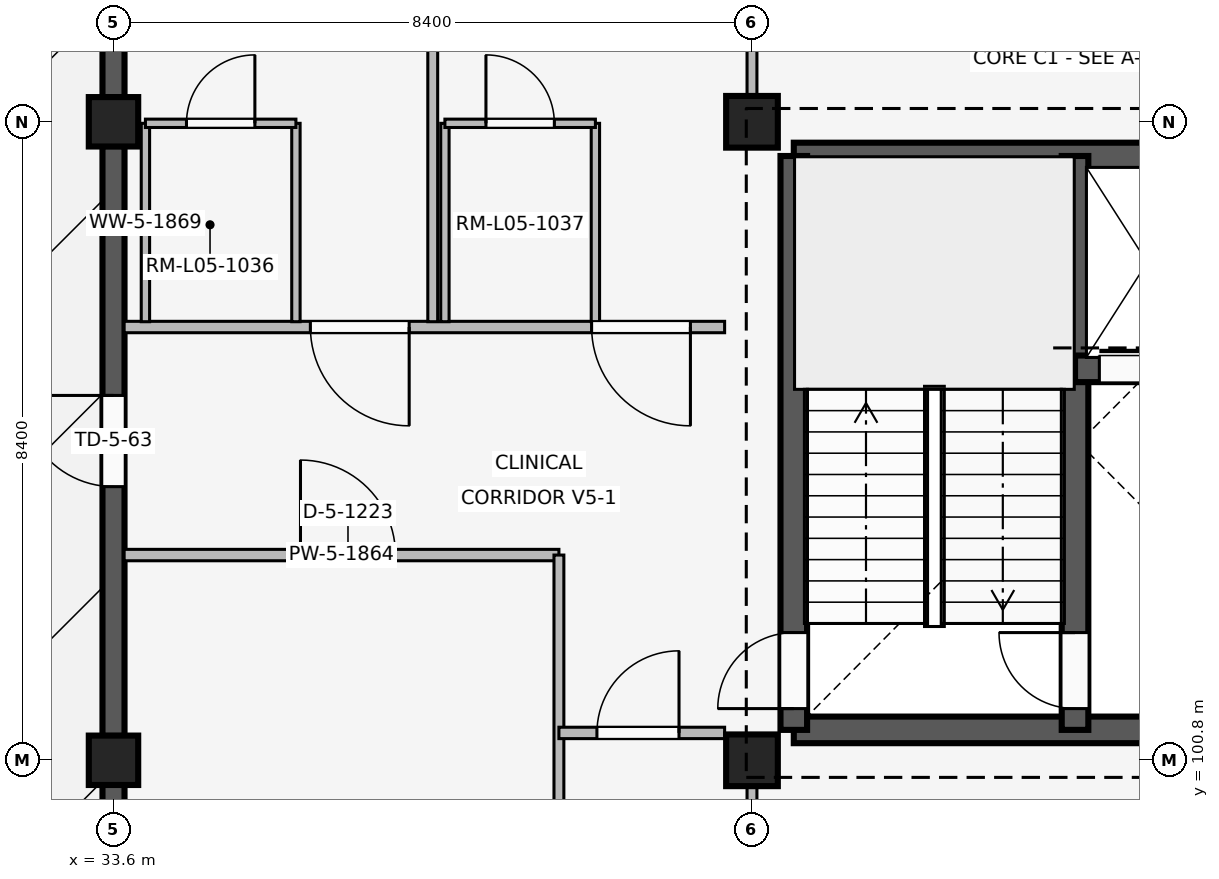
"""IFC4 building model, lengths in metres.
Left out: names, types, materials, properties, quantities, classifications, styles, units other than length and angle.
Written with IfcOpenShell. Run it as: python <this file> out.ifc"""

import sys

from ifc_helpers import new_model, si_unit, direction, frame, frame_2d, origin, origin_2d, place, context, subcontext, project, spatial, rectangle, extrude, element, fill, save


model = new_model("IFC4")
c1 = context("Model", 3, precision=1e-05, world=origin(), true_north=direction((0.0, 1.0)))
c2 = subcontext(c1, "Body", "Model", "MODEL_VIEW")
j1 = project(units=[si_unit("LENGTHUNIT", "METRE"), si_unit("PLANEANGLEUNIT", "RADIAN")], contexts=[c1])
p1 = place(None, origin())
s1 = spatial("IfcSite", under=j1, at=p1, CompositionType="ELEMENT")
p2 = place(p1, origin())
s2 = spatial("IfcBuilding", under=s1, at=p2, CompositionType="ELEMENT")
p3 = place(p2, frame((0.0, 0.0, 20.4)))
s3 = spatial("IfcBuildingStorey", under=s2, at=p3, CompositionType="ELEMENT", Elevation=20.4)
for number, where, z_axis, x_axis in (
    (1, (33.6, 100.8, 0.0), (0.0, 0.0, 1.0), (1.0, 0.0, 0.0)),
    (2, (33.6, 109.2, 0.0), (0.0, 0.0, 1.0), (1.0, 0.0, 0.0)),
):
    element("IfcColumn", number, at=place(p3, frame(where, z_axis=z_axis, x_axis=x_axis)), inside=s3, PredefinedType="COLUMN", context=c2, shape_type="SweptSolid", body=[
        extrude(rectangle(XDim=0.65, YDim=0.65, at=origin_2d()), origin(), (0.0, 0.0, 1.0), 4.2),
    ])
for number, where, z_axis, x_axis in (
    (3, (42.0, 100.8, 0.0), (0.0, 0.0, 1.0), (1.0, 0.0, 0.0)),
    (4, (42.0, 109.2, 0.0), (0.0, 0.0, 1.0), (1.0, 0.0, 0.0)),
):
    element("IfcColumn", number, at=place(p3, frame(where, z_axis=z_axis, x_axis=x_axis)), inside=s3, PredefinedType="COLUMN", context=c2, shape_type="SweptSolid", body=[
        extrude(rectangle(XDim=0.68, YDim=0.68, at=origin_2d()), origin(), (0.0, 0.0, 1.0), 4.2),
    ])
p4 = place(p3, frame((33.6, 92.72, 0.0), z_axis=(0.0, 0.0, 1.0), x_axis=(0.0, 1.0, 0.0)))
e5 = element("IfcWall", 5, at=p4, inside=s3, PredefinedType="SOLIDWALL", context=c2, shape_type="SweptSolid", body=[
    extrude(rectangle(XDim=7.76, YDim=0.29, at=frame_2d((3.88, 0.0))), origin(), (0.0, 0.0, 1.0), 3.34),
])
p5 = place(p4, frame((1.41, 0.0, 0.85)))
e6 = element("IfcOpeningElement", 6, at=p5, cuts=e5, PredefinedType="OPENING", context=c2, shape_type="SweptSolid", body=[
    extrude(rectangle(XDim=0.75, YDim=1.85, at=frame_2d((0.375, 0.925))), frame((0.0, 0.155, 0.0), z_axis=(0.0, -1.0, 0.0), x_axis=(1.0, 0.0, 0.0)), (0.0, 0.0, 1.0), 0.31),
])
p6 = place(p4, frame((5.6, 0.0, 0.85)))
e7 = element("IfcOpeningElement", 7, at=p6, cuts=e5, PredefinedType="OPENING", context=c2, shape_type="SweptSolid", body=[
    extrude(rectangle(XDim=0.75, YDim=1.85, at=frame_2d((0.375, 0.925))), frame((0.0, 0.155, 0.0), z_axis=(0.0, -1.0, 0.0), x_axis=(1.0, 0.0, 0.0)), (0.0, 0.0, 1.0), 0.31),
])
p7 = place(p3, frame((33.6, 101.12, 0.0), z_axis=(0.0, 0.0, 1.0), x_axis=(0.0, 1.0, 0.0)))
e8 = element("IfcWall", 8, at=p7, inside=s3, PredefinedType="SOLIDWALL", context=c2, shape_type="SweptSolid", body=[
    extrude(rectangle(XDim=7.76, YDim=0.29, at=frame_2d((3.88, 0.0))), origin(), (0.0, 0.0, 1.0), 3.34),
])
p8 = place(p7, frame((3.28, 0.0, 0.0)))
e9 = element("IfcOpeningElement", 9, at=p8, cuts=e8, PredefinedType="OPENING", context=c2, shape_type="SweptSolid", body=[
    extrude(rectangle(XDim=1.2, YDim=2.25, at=frame_2d((0.6, 1.125))), frame((0.0, 0.155, 0.0), z_axis=(0.0, -1.0, 0.0), x_axis=(1.0, 0.0, 0.0)), (0.0, 0.0, 1.0), 0.31),
])
p9 = place(p3, frame((33.6, 109.52, 0.0), z_axis=(0.0, 0.0, 1.0), x_axis=(0.0, 1.0, 0.0)))
e10 = element("IfcWall", 10, at=p9, inside=s3, PredefinedType="SOLIDWALL", context=c2, shape_type="SweptSolid", body=[
    extrude(rectangle(XDim=7.76, YDim=0.29, at=frame_2d((3.88, 0.0))), origin(), (0.0, 0.0, 1.0), 3.34),
])
p10 = place(p9, frame((1.31, 0.0, 0.85)))
e11 = element("IfcOpeningElement", 11, at=p10, cuts=e10, PredefinedType="OPENING", context=c2, shape_type="SweptSolid", body=[
    extrude(rectangle(XDim=0.95, YDim=1.6, at=frame_2d((0.475, 0.8))), frame((0.0, 0.155, 0.0), z_axis=(0.0, -1.0, 0.0), x_axis=(1.0, 0.0, 0.0)), (0.0, 0.0, 1.0), 0.31),
])
p11 = place(p9, frame((5.5, 0.0, 0.85)))
e12 = element("IfcOpeningElement", 12, at=p11, cuts=e10, PredefinedType="OPENING", context=c2, shape_type="SweptSolid", body=[
    extrude(rectangle(XDim=0.95, YDim=1.6, at=frame_2d((0.475, 0.8))), frame((0.0, 0.155, 0.0), z_axis=(0.0, -1.0, 0.0), x_axis=(1.0, 0.0, 0.0)), (0.0, 0.0, 1.0), 0.31),
])
p12 = place(p3, frame((42.55, 101.2, 0.0), z_axis=(0.0, 0.0, 1.0), x_axis=(1.0, 0.0, 0.0)))
e13 = element("IfcWall", 13, at=p12, inside=s3, PredefinedType="SHEAR", context=c2, shape_type="SweptSolid", body=[
    extrude(rectangle(XDim=7.5, YDim=0.35, at=frame_2d((3.75, 0.0))), origin(), (0.0, 0.0, 1.0), 3.92),
])
p13 = place(p12, frame((4.85, 0.0, 0.0)))
e14 = element("IfcOpeningElement", 14, at=p13, cuts=e13, PredefinedType="OPENING", context=c2, shape_type="SweptSolid", body=[
    extrude(rectangle(XDim=1.2, YDim=2.2, at=frame_2d((0.6, 1.1))), frame((0.0, 0.185, 0.0), z_axis=(0.0, -1.0, 0.0), x_axis=(1.0, 0.0, 0.0)), (0.0, 0.0, 1.0), 0.37),
])
p14 = place(p3, frame((42.55, 108.75, 0.0), z_axis=(0.0, 0.0, 1.0), x_axis=(1.0, 0.0, 0.0)))
e15 = element("IfcWall", 15, at=p14, inside=s3, PredefinedType="SHEAR", context=c2, shape_type="SweptSolid", body=[
    extrude(rectangle(XDim=7.5, YDim=0.35, at=frame_2d((3.75, 0.0))), origin(), (0.0, 0.0, 1.0), 3.92),
])
p15 = place(p3, frame((42.55, 101.2, 0.0), z_axis=(0.0, 0.0, 1.0), x_axis=(0.0, 1.0, 0.0)))
e16 = element("IfcWall", 16, at=p15, inside=s3, PredefinedType="SHEAR", context=c2, shape_type="SweptSolid", body=[
    extrude(rectangle(XDim=7.55, YDim=0.35, at=frame_2d((3.775, 0.0))), origin(), (0.0, 0.0, 1.0), 3.92),
])
p16 = place(p15, frame((0.28, 0.0, 0.0)))
e17 = element("IfcOpeningElement", 17, at=p16, cuts=e16, PredefinedType="OPENING", context=c2, shape_type="SweptSolid", body=[
    extrude(rectangle(XDim=1.0, YDim=2.15, at=frame_2d((0.5, 1.075))), frame((0.0, 0.185, 0.0), z_axis=(0.0, -1.0, 0.0), x_axis=(1.0, 0.0, 0.0)), (0.0, 0.0, 1.0), 0.37),
])
p17 = place(p3, frame((46.25, 101.2, 0.0), z_axis=(0.0, 0.0, 1.0), x_axis=(0.0, 1.0, 0.0)))
e18 = element("IfcWall", 18, at=p17, inside=s3, PredefinedType="SHEAR", context=c2, shape_type="SweptSolid", body=[
    extrude(rectangle(XDim=7.55, YDim=0.35, at=frame_2d((3.775, 0.0))), origin(), (0.0, 0.0, 1.0), 3.92),
])
p18 = place(p17, frame((0.28, 0.0, 0.0)))
e19 = element("IfcOpeningElement", 19, at=p18, cuts=e18, PredefinedType="OPENING", context=c2, shape_type="SweptSolid", body=[
    extrude(rectangle(XDim=1.0, YDim=2.15, at=frame_2d((0.5, 1.075))), frame((0.0, 0.185, 0.0), z_axis=(0.0, -1.0, 0.0), x_axis=(1.0, 0.0, 0.0)), (0.0, 0.0, 1.0), 0.37),
])
p19 = place(p3, frame((46.25, 105.95, 0.0), z_axis=(0.0, 0.0, 1.0), x_axis=(1.0, 0.0, 0.0)))
e20 = element("IfcWall", 20, at=p19, inside=s3, PredefinedType="SHEAR", context=c2, shape_type="SweptSolid", body=[
    extrude(rectangle(XDim=3.8, YDim=0.35, at=frame_2d((1.9, 0.0))), origin(), (0.0, 0.0, 1.0), 3.92),
])
p20 = place(p19, frame((0.32, 0.0, 0.0)))
e21 = element("IfcOpeningElement", 21, at=p20, cuts=e20, PredefinedType="OPENING", context=c2, shape_type="SweptSolid", body=[
    extrude(rectangle(XDim=1.35, YDim=2.25, at=frame_2d((0.675, 1.125))), frame((0.0, 0.185, 0.0), z_axis=(0.0, -1.0, 0.0), x_axis=(1.0, 0.0, 0.0)), (0.0, 0.0, 1.0), 0.37),
])
p21 = place(p19, frame((2.04, 0.0, 0.0)))
e22 = element("IfcOpeningElement", 22, at=p21, cuts=e20, PredefinedType="OPENING", context=c2, shape_type="SweptSolid", body=[
    extrude(rectangle(XDim=1.4, YDim=2.25, at=frame_2d((0.7, 1.125))), frame((0.0, 0.185, 0.0), z_axis=(0.0, -1.0, 0.0), x_axis=(1.0, 0.0, 0.0)), (0.0, 0.0, 1.0), 0.37),
])
p22 = place(p3, frame((33.74, 103.5, 0.0), z_axis=(0.0, 0.0, 1.0), x_axis=(1.0, 0.0, 0.0)))
e23 = element("IfcWall", 23, at=p22, inside=s3, PredefinedType="PARTITIONING", context=c2, shape_type="SweptSolid", body=[
    extrude(rectangle(XDim=5.72, YDim=0.15, at=frame_2d((2.86, 0.0))), origin(), (0.0, 0.0, 1.0), 3.32),
])
p23 = place(p22, frame((2.32, 0.0, 0.0)))
e24 = element("IfcOpeningElement", 24, at=p23, cuts=e23, PredefinedType="OPENING", context=c2, shape_type="SweptSolid", body=[
    extrude(rectangle(XDim=1.25, YDim=2.2, at=frame_2d((0.625, 1.1))), frame((0.0, 0.085, 0.0), z_axis=(0.0, -1.0, 0.0), x_axis=(1.0, 0.0, 0.0)), (0.0, 0.0, 1.0), 0.17),
])
p24 = place(p3, frame((39.46, 92.56, 0.0), z_axis=(0.0, 0.0, 1.0), x_axis=(0.0, 1.0, 0.0)))
e25 = element("IfcWall", 25, at=p24, inside=s3, PredefinedType="PARTITIONING", context=c2, shape_type="SweptSolid", body=[
    extrude(rectangle(XDim=10.94, YDim=0.13, at=frame_2d((5.47, 0.0))), origin(), (0.0, 0.0, 1.0), 3.32),
])
p25 = place(p3, frame((39.46, 101.16, 0.0), z_axis=(0.0, 0.0, 1.0), x_axis=(1.0, 0.0, 0.0)))
e26 = element("IfcWall", 26, at=p25, inside=s3, PredefinedType="PARTITIONING", context=c2, shape_type="SweptSolid", body=[
    extrude(rectangle(XDim=2.18, YDim=0.15, at=frame_2d((1.09, 0.0))), origin(), (0.0, 0.0, 1.0), 3.32),
])
p26 = place(p25, frame((0.5, 0.0, 0.0)))
e27 = element("IfcOpeningElement", 27, at=p26, cuts=e26, PredefinedType="OPENING", context=c2, shape_type="SweptSolid", body=[
    extrude(rectangle(XDim=1.08, YDim=2.15, at=frame_2d((0.54, 1.075))), frame((0.0, 0.085, 0.0), z_axis=(0.0, -1.0, 0.0), x_axis=(1.0, 0.0, 0.0)), (0.0, 0.0, 1.0), 0.17),
])
p27 = place(p3, frame((41.64, 106.5, 0.0), z_axis=(0.0, 0.0, 1.0), x_axis=(-1.0, 0.0, 0.0)))
e28 = element("IfcWall", 28, at=p27, inside=s3, PredefinedType="PARTITIONING", context=c2, shape_type="SweptSolid", body=[
    extrude(rectangle(XDim=7.9, YDim=0.15, at=frame_2d((3.95, 0.0))), origin(), (0.0, 0.0, 1.0), 3.32),
])
p28 = place(p27, frame((0.45, 0.0, 0.0)))
e29 = element("IfcOpeningElement", 29, at=p28, cuts=e28, PredefinedType="OPENING", context=c2, shape_type="SweptSolid", body=[
    extrude(rectangle(XDim=1.3, YDim=2.25, at=frame_2d((0.65, 1.125))), frame((0.0, 0.085, 0.0), z_axis=(0.0, -1.0, 0.0), x_axis=(1.0, 0.0, 0.0)), (0.0, 0.0, 1.0), 0.17),
])
p29 = place(p27, frame((4.15, 0.0, 0.0)))
e30 = element("IfcOpeningElement", 30, at=p29, cuts=e28, PredefinedType="OPENING", context=c2, shape_type="SweptSolid", body=[
    extrude(rectangle(XDim=1.3, YDim=2.25, at=frame_2d((0.65, 1.125))), frame((0.0, 0.085, 0.0), z_axis=(0.0, -1.0, 0.0), x_axis=(1.0, 0.0, 0.0)), (0.0, 0.0, 1.0), 0.17),
])
p30 = place(p3, frame((37.8, 106.57, 0.0), z_axis=(0.0, 0.0, 1.0), x_axis=(0.0, 1.0, 0.0)))
e31 = element("IfcWall", 31, at=p30, inside=s3, PredefinedType="PARTITIONING", context=c2, shape_type="SweptSolid", body=[
    extrude(rectangle(XDim=10.93, YDim=0.13, at=frame_2d((5.465, 0.0))), origin(), (0.0, 0.0, 1.0), 3.32),
])
for number, where, z_axis, x_axis in (
    (32, (34.02, 106.57, 0.0), (0.0, 0.0, 1.0), (0.0, 1.0, 0.0)),
    (33, (36.0, 106.57, 0.0), (0.0, 0.0, 1.0), (0.0, 1.0, 0.0)),
):
    element("IfcWall", number, at=place(p3, frame(where, z_axis=z_axis, x_axis=x_axis)), inside=s3, PredefinedType="PARTITIONING", context=c2, shape_type="SweptSolid", body=[
        extrude(rectangle(XDim=2.61, YDim=0.11, at=frame_2d((1.305, 0.0))), origin(), (0.0, 0.0, 1.0), 3.32),
    ])
p31 = place(p3, frame((34.02, 109.18, 0.0), z_axis=(0.0, 0.0, 1.0), x_axis=(1.0, 0.0, 0.0)))
e34 = element("IfcWall", 34, at=p31, inside=s3, PredefinedType="PARTITIONING", context=c2, shape_type="SweptSolid", body=[
    extrude(rectangle(XDim=1.98, YDim=0.11, at=frame_2d((0.99, 0.0))), origin(), (0.0, 0.0, 1.0), 3.32),
])
p32 = place(p31, frame((0.54, 0.0, 0.0)))
e35 = element("IfcOpeningElement", 35, at=p32, cuts=e34, PredefinedType="OPENING", context=c2, shape_type="SweptSolid", body=[
    extrude(rectangle(XDim=0.9, YDim=2.1, at=frame_2d((0.45, 1.05))), frame((0.0, 0.065, 0.0), z_axis=(0.0, -1.0, 0.0), x_axis=(1.0, 0.0, 0.0)), (0.0, 0.0, 1.0), 0.13),
])
for number, where, z_axis, x_axis in (
    (36, (37.96, 106.57, 0.0), (0.0, 0.0, 1.0), (0.0, 1.0, 0.0)),
    (37, (39.94, 106.57, 0.0), (0.0, 0.0, 1.0), (0.0, 1.0, 0.0)),
):
    element("IfcWall", number, at=place(p3, frame(where, z_axis=z_axis, x_axis=x_axis)), inside=s3, PredefinedType="PARTITIONING", context=c2, shape_type="SweptSolid", body=[
        extrude(rectangle(XDim=2.61, YDim=0.11, at=frame_2d((1.305, 0.0))), origin(), (0.0, 0.0, 1.0), 3.32),
    ])
p33 = place(p3, frame((37.96, 109.18, 0.0), z_axis=(0.0, 0.0, 1.0), x_axis=(1.0, 0.0, 0.0)))
e38 = element("IfcWall", 38, at=p33, inside=s3, PredefinedType="PARTITIONING", context=c2, shape_type="SweptSolid", body=[
    extrude(rectangle(XDim=1.98, YDim=0.11, at=frame_2d((0.99, 0.0))), origin(), (0.0, 0.0, 1.0), 3.32),
])
p34 = place(p33, frame((0.54, 0.0, 0.0)))
e39 = element("IfcOpeningElement", 39, at=p34, cuts=e38, PredefinedType="OPENING", context=c2, shape_type="SweptSolid", body=[
    extrude(rectangle(XDim=0.9, YDim=2.1, at=frame_2d((0.45, 1.05))), frame((0.0, 0.065, 0.0), z_axis=(0.0, -1.0, 0.0), x_axis=(1.0, 0.0, 0.0)), (0.0, 0.0, 1.0), 0.13),
])
p35 = place(p3, frame((42.0, 92.54, 0.0), z_axis=(0.0, 0.0, 1.0), x_axis=(0.0, 1.0, 0.0)))
e40 = element("IfcWall", 40, at=p35, inside=s3, PredefinedType="PARTITIONING", context=c2, shape_type="SweptSolid", body=[
    extrude(rectangle(XDim=8.21, YDim=0.13, at=frame_2d((4.105, 0.0))), origin(), (0.0, 0.0, 1.0), 3.32),
])
p36 = place(p35, frame((3.64, 0.0, 0.0)))
e41 = element("IfcOpeningElement", 41, at=p36, cuts=e40, PredefinedType="OPENING", context=c2, shape_type="SweptSolid", body=[
    extrude(rectangle(XDim=1.08, YDim=2.15, at=frame_2d((0.54, 1.075))), frame((0.0, 0.075, 0.0), z_axis=(0.0, -1.0, 0.0), x_axis=(1.0, 0.0, 0.0)), (0.0, 0.0, 1.0), 0.15),
])
p37 = place(p3, frame((42.0, 109.55, 0.0), z_axis=(0.0, 0.0, 1.0), x_axis=(0.0, 1.0, 0.0)))
e42 = element("IfcWall", 42, at=p37, inside=s3, PredefinedType="PARTITIONING", context=c2, shape_type="SweptSolid", body=[
    extrude(rectangle(XDim=7.91, YDim=0.13, at=frame_2d((3.955, 0.0))), origin(), (0.0, 0.0, 1.0), 3.32),
])
p38 = place(p37, frame((3.4, 0.0, 0.0)))
e43 = element("IfcOpeningElement", 43, at=p38, cuts=e42, PredefinedType="OPENING", context=c2, shape_type="SweptSolid", body=[
    extrude(rectangle(XDim=1.05, YDim=2.2, at=frame_2d((0.525, 1.1))), frame((0.0, 0.075, 0.0), z_axis=(0.0, -1.0, 0.0), x_axis=(1.0, 0.0, 0.0)), (0.0, 0.0, 1.0), 0.15),
])
p39 = place(p8, origin())
e44 = element("IfcDoor", 44, at=p39, inside=s3, OperationType="SINGLE_SWING_RIGHT", PredefinedType="DOOR", context=c2, shape_type="SweptSolid", body=[
    extrude(rectangle(XDim=1.2, YDim=2.25, at=frame_2d((0.6, 1.125))), frame((0.0, 0.025, 0.0), z_axis=(0.0, -1.0, 0.0), x_axis=(1.0, 0.0, 0.0)), (0.0, 0.0, 1.0), 0.05),
])
fill(e9, e44)
p40 = place(p16, origin())
e45 = element("IfcDoor", 45, at=p40, inside=s3, OperationType="SINGLE_SWING_LEFT", PredefinedType="DOOR", context=c2, shape_type="SweptSolid", body=[
    extrude(rectangle(XDim=1.0, YDim=2.15, at=frame_2d((0.5, 1.075))), frame((0.0, 0.025, 0.0), z_axis=(0.0, -1.0, 0.0), x_axis=(1.0, 0.0, 0.0)), (0.0, 0.0, 1.0), 0.05),
])
fill(e17, e45)
p41 = place(p18, origin())
e46 = element("IfcDoor", 46, at=p41, inside=s3, OperationType="SINGLE_SWING_RIGHT", PredefinedType="DOOR", context=c2, shape_type="SweptSolid", body=[
    extrude(rectangle(XDim=1.0, YDim=2.15, at=frame_2d((0.5, 1.075))), frame((0.0, 0.025, 0.0), z_axis=(0.0, -1.0, 0.0), x_axis=(1.0, 0.0, 0.0)), (0.0, 0.0, 1.0), 0.05),
])
fill(e19, e46)
p42 = place(p20, origin())
e47 = element("IfcDoor", 47, at=p42, inside=s3, OperationType="SLIDING_TO_LEFT", PredefinedType="DOOR", context=c2, shape_type="SweptSolid", body=[
    extrude(rectangle(XDim=1.35, YDim=2.25, at=frame_2d((0.675, 1.125))), frame((0.0, 0.025, 0.0), z_axis=(0.0, -1.0, 0.0), x_axis=(1.0, 0.0, 0.0)), (0.0, 0.0, 1.0), 0.05),
])
fill(e21, e47)
p43 = place(p23, origin())
e48 = element("IfcDoor", 48, at=p43, inside=s3, OperationType="SINGLE_SWING_LEFT", PredefinedType="DOOR", context=c2, shape_type="SweptSolid", body=[
    extrude(rectangle(XDim=1.25, YDim=2.2, at=frame_2d((0.625, 1.1))), frame((0.0, 0.025, 0.0), z_axis=(0.0, -1.0, 0.0), x_axis=(1.0, 0.0, 0.0)), (0.0, 0.0, 1.0), 0.05),
])
fill(e24, e48)
p44 = place(p26, origin())
e49 = element("IfcDoor", 49, at=p44, inside=s3, OperationType="SINGLE_SWING_RIGHT", PredefinedType="DOOR", context=c2, shape_type="SweptSolid", body=[
    extrude(rectangle(XDim=1.08, YDim=2.15, at=frame_2d((0.54, 1.075))), frame((0.0, 0.025, 0.0), z_axis=(0.0, -1.0, 0.0), x_axis=(1.0, 0.0, 0.0)), (0.0, 0.0, 1.0), 0.05),
])
fill(e27, e49)
p45 = place(p28, origin())
e50 = element("IfcDoor", 50, at=p45, inside=s3, OperationType="SINGLE_SWING_LEFT", PredefinedType="DOOR", context=c2, shape_type="SweptSolid", body=[
    extrude(rectangle(XDim=1.3, YDim=2.25, at=frame_2d((0.65, 1.125))), frame((0.0, 0.025, 0.0), z_axis=(0.0, -1.0, 0.0), x_axis=(1.0, 0.0, 0.0)), (0.0, 0.0, 1.0), 0.05),
])
fill(e29, e50)
p46 = place(p29, origin())
e51 = element("IfcDoor", 51, at=p46, inside=s3, OperationType="SINGLE_SWING_LEFT", PredefinedType="DOOR", context=c2, shape_type="SweptSolid", body=[
    extrude(rectangle(XDim=1.3, YDim=2.25, at=frame_2d((0.65, 1.125))), frame((0.0, 0.025, 0.0), z_axis=(0.0, -1.0, 0.0), x_axis=(1.0, 0.0, 0.0)), (0.0, 0.0, 1.0), 0.05),
])
fill(e30, e51)
p47 = place(p32, origin())
e52 = element("IfcDoor", 52, at=p47, inside=s3, OperationType="SINGLE_SWING_RIGHT", PredefinedType="DOOR", context=c2, shape_type="SweptSolid", body=[
    extrude(rectangle(XDim=0.9, YDim=2.1, at=frame_2d((0.45, 1.05))), frame((0.0, 0.025, 0.0), z_axis=(0.0, -1.0, 0.0), x_axis=(1.0, 0.0, 0.0)), (0.0, 0.0, 1.0), 0.05),
])
fill(e35, e52)
p48 = place(p34, origin())
e53 = element("IfcDoor", 53, at=p48, inside=s3, OperationType="SINGLE_SWING_LEFT", PredefinedType="DOOR", context=c2, shape_type="SweptSolid", body=[
    extrude(rectangle(XDim=0.9, YDim=2.1, at=frame_2d((0.45, 1.05))), frame((0.0, 0.025, 0.0), z_axis=(0.0, -1.0, 0.0), x_axis=(1.0, 0.0, 0.0)), (0.0, 0.0, 1.0), 0.05),
])
fill(e39, e53)
save(model, sys.argv[1])
